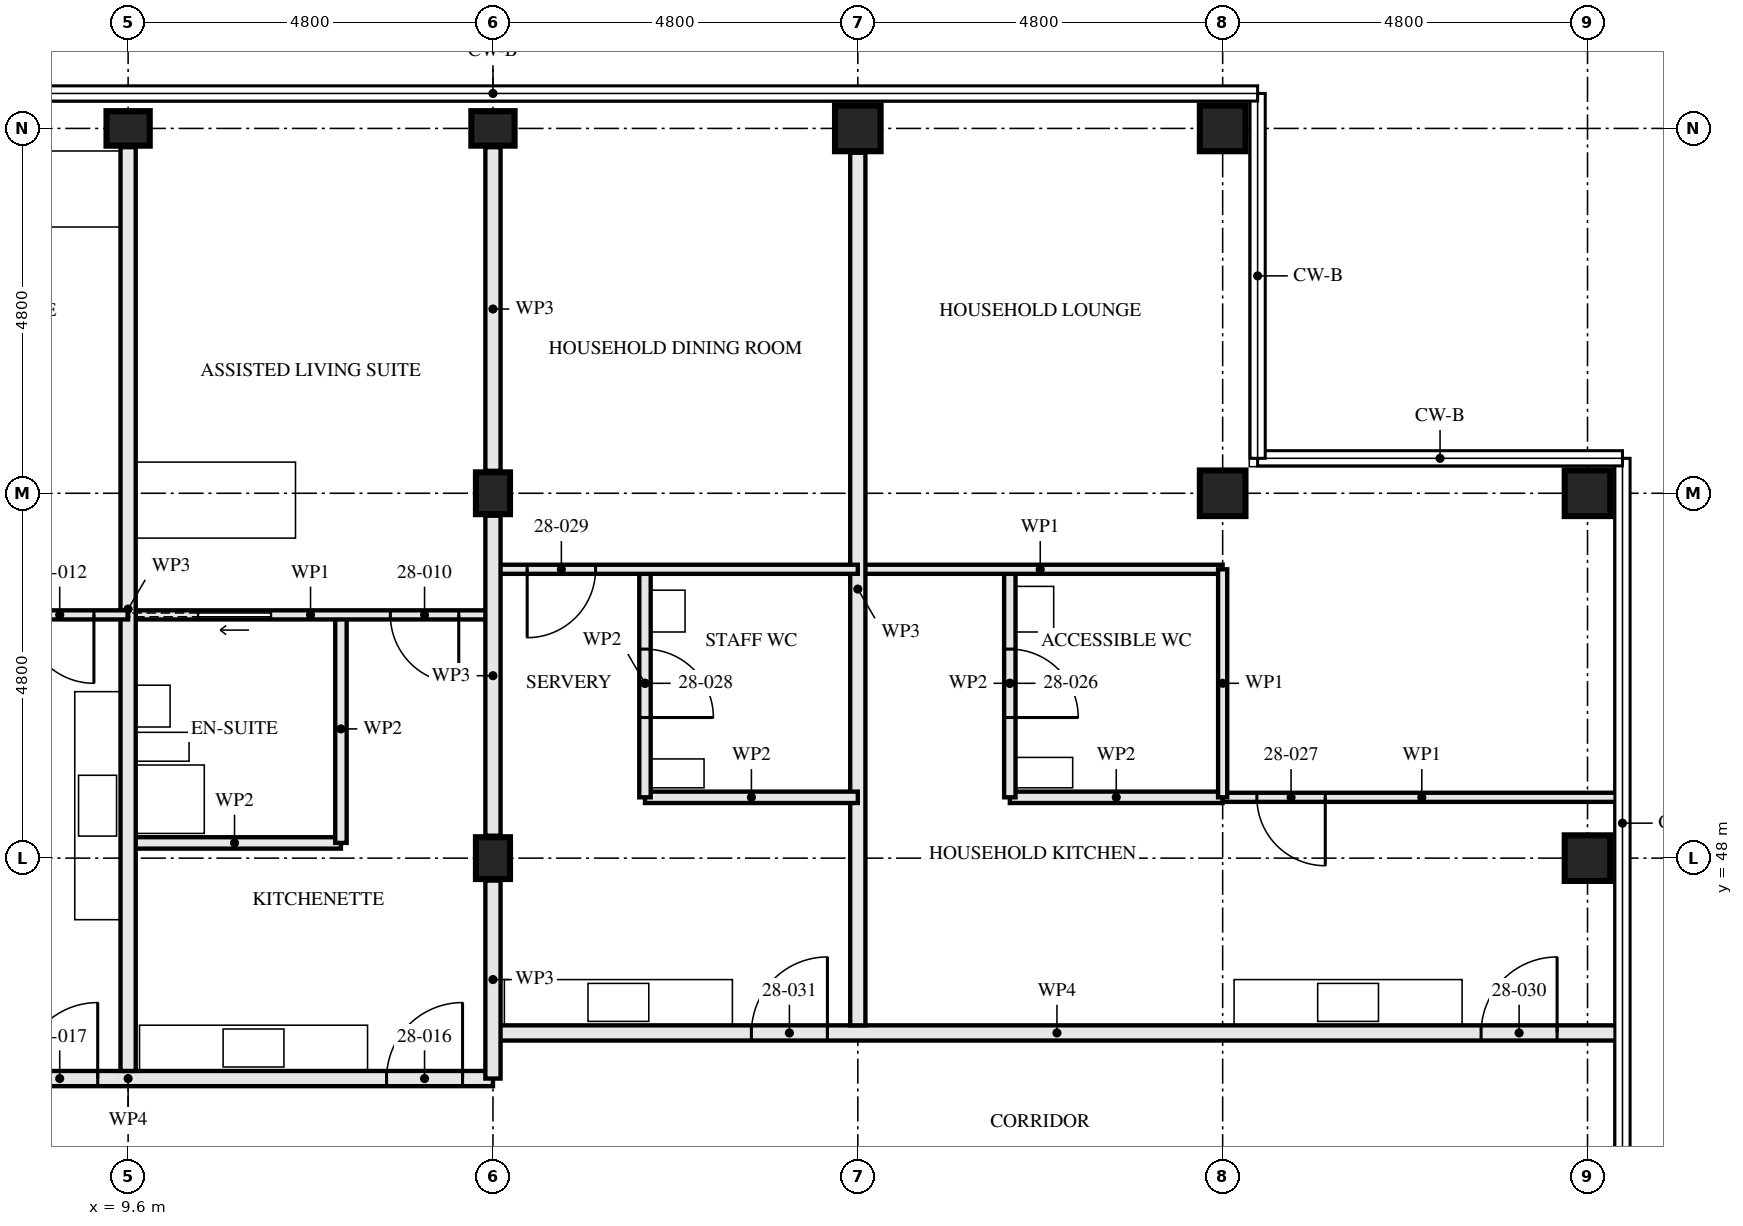
"""IFC4 building model, lengths in metres.
Left out: names, types, materials, properties, quantities, classifications, styles, units other than length and angle.
Written with IfcOpenShell. Run it as: python <this file> out.ifc"""

import sys

from ifc_helpers import new_model, si_unit, direction, frame, frame_2d, origin, origin_2d, place, context, subcontext, project, spatial, rectangle, hollow_rectangle, i_section, extrude, element, fill, save


model = new_model("IFC4")
c1 = context("Model", 3, precision=1e-05, world=origin(), true_north=direction((0.0, 1.0)))
c2 = subcontext(c1, "Body", "Model", "MODEL_VIEW")
j1 = project(units=[si_unit("LENGTHUNIT", "METRE"), si_unit("PLANEANGLEUNIT", "RADIAN")], contexts=[c1])
p1 = place(None, origin())
s1 = spatial("IfcSite", under=j1, at=p1, CompositionType="ELEMENT")
p2 = place(p1, origin())
s2 = spatial("IfcBuilding", under=s1, at=p2, CompositionType="ELEMENT")
p3 = place(p2, frame((0.0, 0.0, 105.0)))
s3 = spatial("IfcBuildingStorey", under=s2, at=p3, CompositionType="ELEMENT", Elevation=105.0)
p4 = place(p3, frame((9.6, 57.6, 0.0), z_axis=(0.0, 0.0, 1.0), x_axis=(0.0, 1.0, 0.0)))
e1 = element("IfcColumn", 1, at=p4, inside=s3, PredefinedType="COLUMN", context=c2, shape_type="SweptSolid", body=[
    extrude(i_section(OverallWidth=0.454, OverallDepth=0.569, WebThickness=0.078, FlangeThickness=0.125, FilletRadius=0.015, at=origin_2d()), origin(), (0.0, 0.0, 1.0), 3.5),
])
for number, where, z_axis, x_axis in (
    (2, (14.4, 48.0, 0.0), (0.0, 0.0, 1.0), (1.0, 0.0, 0.0)),
    (3, (14.4, 52.8, 0.0), (0.0, 0.0, 1.0), (1.0, 0.0, 0.0)),
):
    element("IfcColumn", number, at=place(p3, frame(where, z_axis=z_axis, x_axis=x_axis)), inside=s3, PredefinedType="COLUMN", context=c2, shape_type="SweptSolid", body=[
        extrude(i_section(OverallWidth=0.448, OverallDepth=0.55, WebThickness=0.072, FlangeThickness=0.115, FilletRadius=0.015, at=origin_2d()), origin(), (0.0, 0.0, 1.0), 3.5),
    ])
p5 = place(p3, frame((14.4, 57.6, 0.0), z_axis=(0.0, 0.0, 1.0), x_axis=(0.0, 1.0, 0.0)))
e4 = element("IfcColumn", 4, at=p5, inside=s3, PredefinedType="COLUMN", context=c2, shape_type="SweptSolid", body=[
    extrude(i_section(OverallWidth=0.454, OverallDepth=0.569, WebThickness=0.078, FlangeThickness=0.125, FilletRadius=0.015, at=origin_2d()), origin(), (0.0, 0.0, 1.0), 3.5),
])
for number, where, z_axis, x_axis in (
    (5, (19.2, 57.6, 0.0), (0.0, 0.0, 1.0), (0.0, 1.0, 0.0)),
    (6, (24.0, 52.8, 0.0), (0.0, 0.0, 1.0), (0.0, 1.0, 0.0)),
    (7, (24.0, 57.6, 0.0), (0.0, 0.0, 1.0), (0.0, 1.0, 0.0)),
):
    element("IfcColumn", number, at=place(p3, frame(where, z_axis=z_axis, x_axis=x_axis)), inside=s3, PredefinedType="COLUMN", context=c2, shape_type="SweptSolid", body=[
        extrude(hollow_rectangle(XDim=0.6, YDim=0.6, WallThickness=0.06, at=origin_2d()), origin(), (0.0, 0.0, 1.0), 3.5),
    ])
p6 = place(p3, frame((28.8, 48.0, 0.0), z_axis=(0.0, 0.0, 1.0), x_axis=(1.0, 0.0, 0.0)))
e8 = element("IfcColumn", 8, at=p6, inside=s3, PredefinedType="COLUMN", context=c2, shape_type="SweptSolid", body=[
    extrude(hollow_rectangle(XDim=0.6, YDim=0.6, WallThickness=0.08, at=origin_2d()), origin(), (0.0, 0.0, 1.0), 3.5),
])
p7 = place(p3, frame((28.8, 52.8, 0.0), z_axis=(0.0, 0.0, 1.0), x_axis=(0.0, 1.0, 0.0)))
e9 = element("IfcColumn", 9, at=p7, inside=s3, PredefinedType="COLUMN", context=c2, shape_type="SweptSolid", body=[
    extrude(hollow_rectangle(XDim=0.6, YDim=0.6, WallThickness=0.06, at=origin_2d()), origin(), (0.0, 0.0, 1.0), 3.5),
])
p8 = place(p3, frame((12.4, 51.2, 0.0), z_axis=(0.0, 0.0, 1.0), x_axis=(0.0, -1.0, 0.0)))
e10 = element("IfcWall", 10, at=p8, inside=s3, PredefinedType="PARTITIONING", context=c2, shape_type="SweptSolid", body=[
    extrude(rectangle(XDim=3.0, YDim=0.15, at=frame_2d((1.5, 0.0))), origin(), (0.0, 0.0, 1.0), 3.33),
])
p9 = place(p3, frame((12.4, 48.2, 0.0), z_axis=(0.0, 0.0, 1.0), x_axis=(-1.0, 0.0, 0.0)))
e11 = element("IfcWall", 11, at=p9, inside=s3, PredefinedType="PARTITIONING", context=c2, shape_type="SweptSolid", body=[
    extrude(rectangle(XDim=2.8, YDim=0.15, at=frame_2d((1.4, 0.0))), origin(), (0.0, 0.0, 1.0), 3.33),
])
p10 = place(p3, frame((14.4, 51.2, 0.0), z_axis=(0.0, 0.0, 1.0), x_axis=(-1.0, 0.0, 0.0)))
e12 = element("IfcWall", 12, at=p10, inside=s3, PredefinedType="PARTITIONING", context=c2, shape_type="SweptSolid", body=[
    extrude(rectangle(XDim=4.8, YDim=0.12, at=frame_2d((2.4, 0.0))), origin(), (0.0, 0.0, 1.0), 3.33),
])
p11 = place(p10, frame((0.45, 0.0, 0.0)))
e13 = element("IfcOpeningElement", 13, at=p11, cuts=e12, PredefinedType="OPENING", context=c2, shape_type="SweptSolid", body=[
    extrude(rectangle(XDim=0.9, YDim=2.1, at=frame_2d((0.45, 1.05))), frame((0.0, 0.071, 0.0), z_axis=(0.0, -1.0, 0.0), x_axis=(1.0, 0.0, 0.0)), (0.0, 0.0, 1.0), 0.141),
])
p12 = place(p10, frame((2.925, 0.0, 0.0)))
e14 = element("IfcOpeningElement", 14, at=p12, cuts=e12, PredefinedType="OPENING", context=c2, shape_type="SweptSolid", body=[
    extrude(rectangle(XDim=0.95, YDim=2.1, at=frame_2d((0.475, 1.05))), frame((0.0, 0.071, 0.0), z_axis=(0.0, -1.0, 0.0), x_axis=(1.0, 0.0, 0.0)), (0.0, 0.0, 1.0), 0.141),
])
p13 = place(p3, frame((9.6, 57.353, 0.0), z_axis=(0.0, 0.0, 1.0), x_axis=(0.0, -1.0, 0.0)))
e15 = element("IfcWall", 15, at=p13, inside=s3, PredefinedType="PARTITIONING", context=c2, shape_type="SweptSolid", body=[
    extrude(rectangle(XDim=12.153, YDim=0.2, at=frame_2d((6.077, 0.0))), origin(), (0.0, 0.0, 1.0), 2.55),
])
p14 = place(p3, frame((9.6, 51.2, 0.0), z_axis=(0.0, 0.0, 1.0), x_axis=(-1.0, 0.0, 0.0)))
e16 = element("IfcWall", 16, at=p14, inside=s3, PredefinedType="PARTITIONING", context=c2, shape_type="SweptSolid", body=[
    extrude(rectangle(XDim=4.8, YDim=0.12, at=frame_2d((2.4, 0.0))), origin(), (0.0, 0.0, 1.0), 3.33),
])
p15 = place(p14, frame((0.45, 0.0, 0.0)))
e17 = element("IfcOpeningElement", 17, at=p15, cuts=e16, PredefinedType="OPENING", context=c2, shape_type="SweptSolid", body=[
    extrude(rectangle(XDim=0.9, YDim=2.1, at=frame_2d((0.45, 1.05))), frame((0.0, 0.071, 0.0), z_axis=(0.0, -1.0, 0.0), x_axis=(1.0, 0.0, 0.0)), (0.0, 0.0, 1.0), 0.141),
])
p16 = place(p14, frame((2.925, 0.0, 0.0)))
e18 = element("IfcOpeningElement", 18, at=p16, cuts=e16, PredefinedType="OPENING", context=c2, shape_type="SweptSolid", body=[
    extrude(rectangle(XDim=0.95, YDim=2.1, at=frame_2d((0.475, 1.05))), frame((0.0, 0.071, 0.0), z_axis=(0.0, -1.0, 0.0), x_axis=(1.0, 0.0, 0.0)), (0.0, 0.0, 1.0), 0.141),
])
p17 = place(p3, frame((14.4, 45.1, 0.0), z_axis=(0.0, 0.0, 1.0), x_axis=(-1.0, 0.0, 0.0)))
e19 = element("IfcWall", 19, at=p17, inside=s3, PredefinedType="PARTITIONING", context=c2, shape_type="SweptSolid", body=[
    extrude(rectangle(XDim=9.6, YDim=0.2, at=frame_2d((4.8, 0.0))), origin(), (0.0, 0.0, 1.0), 3.33),
])
p18 = place(p17, frame((0.4, 0.0, 0.0)))
e20 = element("IfcOpeningElement", 20, at=p18, cuts=e19, PredefinedType="OPENING", context=c2, shape_type="SweptSolid", body=[
    extrude(rectangle(XDim=1.0, YDim=2.1, at=frame_2d((0.5, 1.05))), frame((0.0, 0.111, 0.0), z_axis=(0.0, -1.0, 0.0), x_axis=(1.0, 0.0, 0.0)), (0.0, 0.0, 1.0), 0.221),
])
p19 = place(p17, frame((5.2, 0.0, 0.0)))
e21 = element("IfcOpeningElement", 21, at=p19, cuts=e19, PredefinedType="OPENING", context=c2, shape_type="SweptSolid", body=[
    extrude(rectangle(XDim=1.0, YDim=2.1, at=frame_2d((0.5, 1.05))), frame((0.0, 0.111, 0.0), z_axis=(0.0, -1.0, 0.0), x_axis=(1.0, 0.0, 0.0)), (0.0, 0.0, 1.0), 0.221),
])
p20 = place(p3, frame((21.2, 51.8, 0.0), z_axis=(0.0, 0.0, 1.0), x_axis=(0.0, -1.0, 0.0)))
e22 = element("IfcWall", 22, at=p20, inside=s3, PredefinedType="PARTITIONING", context=c2, shape_type="SweptSolid", body=[
    extrude(rectangle(XDim=3.0, YDim=0.15, at=frame_2d((1.5, 0.0))), origin(), (0.0, 0.0, 1.0), 3.33),
])
p21 = place(p20, frame((1.05, 0.0, 0.0)))
e23 = element("IfcOpeningElement", 23, at=p21, cuts=e22, PredefinedType="OPENING", context=c2, shape_type="SweptSolid", body=[
    extrude(rectangle(XDim=0.9, YDim=2.1, at=frame_2d((0.45, 1.05))), frame((0.0, 0.085, 0.0), z_axis=(0.0, -1.0, 0.0), x_axis=(1.0, 0.0, 0.0)), (0.0, 0.0, 1.0), 0.171),
])
p22 = place(p3, frame((24.0, 48.8, 0.0), z_axis=(0.0, 0.0, 1.0), x_axis=(-1.0, 0.0, 0.0)))
e24 = element("IfcWall", 24, at=p22, inside=s3, PredefinedType="PARTITIONING", context=c2, shape_type="SweptSolid", body=[
    extrude(rectangle(XDim=2.8, YDim=0.15, at=frame_2d((1.4, 0.0))), origin(), (0.0, 0.0, 1.0), 3.33),
])
p23 = place(p3, frame((29.24, 48.8, 0.0), z_axis=(0.0, 0.0, 1.0), x_axis=(-1.0, 0.0, 0.0)))
e25 = element("IfcWall", 25, at=p23, inside=s3, PredefinedType="PARTITIONING", context=c2, shape_type="SweptSolid", body=[
    extrude(rectangle(XDim=5.24, YDim=0.12, at=frame_2d((2.62, 0.0))), origin(), (0.0, 0.0, 1.0), 2.32),
])
p24 = place(p23, frame((3.89, 0.0, 0.0)))
e26 = element("IfcOpeningElement", 26, at=p24, cuts=e25, PredefinedType="OPENING", context=c2, shape_type="SweptSolid", body=[
    extrude(rectangle(XDim=0.9, YDim=2.1, at=frame_2d((0.45, 1.05))), frame((0.0, 0.071, 0.0), z_axis=(0.0, -1.0, 0.0), x_axis=(1.0, 0.0, 0.0)), (0.0, 0.0, 1.0), 0.141),
])
p25 = place(p3, frame((24.0, 51.8, 0.0), z_axis=(0.0, 0.0, 1.0), x_axis=(-1.0, 0.0, 0.0)))
e27 = element("IfcWall", 27, at=p25, inside=s3, PredefinedType="PARTITIONING", context=c2, shape_type="SweptSolid", body=[
    extrude(rectangle(XDim=4.8, YDim=0.12, at=frame_2d((2.4, 0.0))), origin(), (0.0, 0.0, 1.0), 3.33),
])
p26 = place(p3, frame((24.0, 51.8, 0.0), z_axis=(0.0, 0.0, 1.0), x_axis=(0.0, -1.0, 0.0)))
e28 = element("IfcWall", 28, at=p26, inside=s3, PredefinedType="PARTITIONING", context=c2, shape_type="SweptSolid", body=[
    extrude(rectangle(XDim=3.0, YDim=0.12, at=frame_2d((1.5, 0.0))), origin(), (0.0, 0.0, 1.0), 3.33),
])
p27 = place(p3, frame((19.2, 57.28, 0.0), z_axis=(0.0, 0.0, 1.0), x_axis=(0.0, -1.0, 0.0)))
e29 = element("IfcWall", 29, at=p27, inside=s3, PredefinedType="PARTITIONING", context=c2, shape_type="SweptSolid", body=[
    extrude(rectangle(XDim=11.48, YDim=0.2, at=frame_2d((5.74, 0.0))), origin(), (0.0, 0.0, 1.0), 2.55),
])
p28 = place(p3, frame((16.4, 51.8, 0.0), z_axis=(0.0, 0.0, 1.0), x_axis=(0.0, -1.0, 0.0)))
e30 = element("IfcWall", 30, at=p28, inside=s3, PredefinedType="PARTITIONING", context=c2, shape_type="SweptSolid", body=[
    extrude(rectangle(XDim=3.0, YDim=0.15, at=frame_2d((1.5, 0.0))), origin(), (0.0, 0.0, 1.0), 3.33),
])
p29 = place(p28, frame((1.05, 0.0, 0.0)))
e31 = element("IfcOpeningElement", 31, at=p29, cuts=e30, PredefinedType="OPENING", context=c2, shape_type="SweptSolid", body=[
    extrude(rectangle(XDim=0.9, YDim=2.1, at=frame_2d((0.45, 1.05))), frame((0.0, 0.085, 0.0), z_axis=(0.0, -1.0, 0.0), x_axis=(1.0, 0.0, 0.0)), (0.0, 0.0, 1.0), 0.171),
])
p30 = place(p3, frame((19.2, 48.8, 0.0), z_axis=(0.0, 0.0, 1.0), x_axis=(-1.0, 0.0, 0.0)))
e32 = element("IfcWall", 32, at=p30, inside=s3, PredefinedType="PARTITIONING", context=c2, shape_type="SweptSolid", body=[
    extrude(rectangle(XDim=2.8, YDim=0.15, at=frame_2d((1.4, 0.0))), origin(), (0.0, 0.0, 1.0), 3.33),
])
p31 = place(p3, frame((19.2, 51.8, 0.0), z_axis=(0.0, 0.0, 1.0), x_axis=(-1.0, 0.0, 0.0)))
e33 = element("IfcWall", 33, at=p31, inside=s3, PredefinedType="PARTITIONING", context=c2, shape_type="SweptSolid", body=[
    extrude(rectangle(XDim=4.8, YDim=0.12, at=frame_2d((2.4, 0.0))), origin(), (0.0, 0.0, 1.0), 3.33),
])
p32 = place(p31, frame((3.45, 0.0, 0.0)))
e34 = element("IfcOpeningElement", 34, at=p32, cuts=e33, PredefinedType="OPENING", context=c2, shape_type="SweptSolid", body=[
    extrude(rectangle(XDim=0.9, YDim=2.1, at=frame_2d((0.45, 1.05))), frame((0.0, 0.071, 0.0), z_axis=(0.0, -1.0, 0.0), x_axis=(1.0, 0.0, 0.0)), (0.0, 0.0, 1.0), 0.141),
])
p33 = place(p3, frame((29.24, 45.7, 0.0), z_axis=(0.0, 0.0, 1.0), x_axis=(-1.0, 0.0, 0.0)))
e35 = element("IfcWall", 35, at=p33, inside=s3, PredefinedType="PARTITIONING", context=c2, shape_type="SweptSolid", body=[
    extrude(rectangle(XDim=14.84, YDim=0.2, at=frame_2d((7.42, 0.0))), origin(), (0.0, 0.0, 1.0), 2.32),
])
p34 = place(p33, frame((0.84, 0.0, 0.0)))
e36 = element("IfcOpeningElement", 36, at=p34, cuts=e35, PredefinedType="OPENING", context=c2, shape_type="SweptSolid", body=[
    extrude(rectangle(XDim=1.0, YDim=2.1, at=frame_2d((0.5, 1.05))), frame((0.0, 0.111, 0.0), z_axis=(0.0, -1.0, 0.0), x_axis=(1.0, 0.0, 0.0)), (0.0, 0.0, 1.0), 0.221),
])
p35 = place(p33, frame((10.44, 0.0, 0.0)))
e37 = element("IfcOpeningElement", 37, at=p35, cuts=e35, PredefinedType="OPENING", context=c2, shape_type="SweptSolid", body=[
    extrude(rectangle(XDim=1.0, YDim=2.1, at=frame_2d((0.5, 1.05))), frame((0.0, 0.111, 0.0), z_axis=(0.0, -1.0, 0.0), x_axis=(1.0, 0.0, 0.0)), (0.0, 0.0, 1.0), 0.221),
])
p36 = place(p3, frame((14.4, 45.1, 0.0), z_axis=(0.0, 0.0, 1.0), x_axis=(0.0, 1.0, 0.0)))
e38 = element("IfcWall", 38, at=p36, inside=s3, PredefinedType="PARTITIONING", context=c2, shape_type="SweptSolid", body=[
    extrude(rectangle(XDim=2.605, YDim=0.2, at=frame_2d((1.302, 0.0))), origin(), (0.0, 0.0, 1.0), 2.32),
])
p37 = place(p3, frame((14.4, 48.295, 0.0), z_axis=(0.0, 0.0, 1.0), x_axis=(0.0, 1.0, 0.0)))
e39 = element("IfcWall", 39, at=p37, inside=s3, PredefinedType="PARTITIONING", context=c2, shape_type="SweptSolid", body=[
    extrude(rectangle(XDim=4.21, YDim=0.2, at=frame_2d((2.105, 0.0))), origin(), (0.0, 0.0, 1.0), 2.32),
])
p38 = place(p3, frame((14.4, 53.095, 0.0), z_axis=(0.0, 0.0, 1.0), x_axis=(0.0, 1.0, 0.0)))
e40 = element("IfcWall", 40, at=p38, inside=s3, PredefinedType="PARTITIONING", context=c2, shape_type="SweptSolid", body=[
    extrude(rectangle(XDim=4.258, YDim=0.2, at=frame_2d((2.129, 0.0))), origin(), (0.0, 0.0, 1.0), 2.32),
])
p39 = place(p11, origin())
e41 = element("IfcDoor", 41, at=p39, inside=s3, OperationType="SINGLE_SWING_RIGHT", PredefinedType="DOOR", context=c2, shape_type="SweptSolid", body=[
    extrude(rectangle(XDim=0.9, YDim=2.1, at=frame_2d((0.45, 1.05))), frame((0.0, 0.022, 0.0), z_axis=(0.0, -1.0, 0.0), x_axis=(1.0, 0.0, 0.0)), (0.0, 0.0, 1.0), 0.044),
])
fill(e13, e41)
p40 = place(p12, origin())
e42 = element("IfcDoor", 42, at=p40, inside=s3, OperationType="SLIDING_TO_LEFT", PredefinedType="DOOR", context=c2, shape_type="SweptSolid", body=[
    extrude(rectangle(XDim=0.95, YDim=2.1, at=frame_2d((0.475, 1.05))), frame((0.0, 0.022, 0.0), z_axis=(0.0, -1.0, 0.0), x_axis=(1.0, 0.0, 0.0)), (0.0, 0.0, 1.0), 0.044),
])
fill(e14, e42)
p41 = place(p15, origin())
e43 = element("IfcDoor", 43, at=p41, inside=s3, OperationType="SINGLE_SWING_RIGHT", PredefinedType="DOOR", context=c2, shape_type="SweptSolid", body=[
    extrude(rectangle(XDim=0.9, YDim=2.1, at=frame_2d((0.45, 1.05))), frame((0.0, 0.022, 0.0), z_axis=(0.0, -1.0, 0.0), x_axis=(1.0, 0.0, 0.0)), (0.0, 0.0, 1.0), 0.044),
])
fill(e17, e43)
p42 = place(p18, frame((1.0, 0.0, 0.0), z_axis=(0.0, 0.0, 1.0), x_axis=(-1.0, 0.0, 0.0)))
e44 = element("IfcDoor", 44, at=p42, inside=s3, OperationType="SINGLE_SWING_LEFT", PredefinedType="DOOR", context=c2, shape_type="SweptSolid", body=[
    extrude(rectangle(XDim=1.0, YDim=2.1, at=frame_2d((0.5, 1.05))), frame((0.0, 0.027, 0.0), z_axis=(0.0, -1.0, 0.0), x_axis=(1.0, 0.0, 0.0)), (0.0, 0.0, 1.0), 0.054),
])
fill(e20, e44)
p43 = place(p19, frame((1.0, 0.0, 0.0), z_axis=(0.0, 0.0, 1.0), x_axis=(-1.0, 0.0, 0.0)))
e45 = element("IfcDoor", 45, at=p43, inside=s3, OperationType="SINGLE_SWING_LEFT", PredefinedType="DOOR", context=c2, shape_type="SweptSolid", body=[
    extrude(rectangle(XDim=1.0, YDim=2.1, at=frame_2d((0.5, 1.05))), frame((0.0, 0.027, 0.0), z_axis=(0.0, -1.0, 0.0), x_axis=(1.0, 0.0, 0.0)), (0.0, 0.0, 1.0), 0.054),
])
fill(e21, e45)
p44 = place(p21, origin())
e46 = element("IfcDoor", 46, at=p44, inside=s3, OperationType="SINGLE_SWING_LEFT", PredefinedType="DOOR", context=c2, shape_type="SweptSolid", body=[
    extrude(rectangle(XDim=0.9, YDim=2.1, at=frame_2d((0.45, 1.05))), frame((0.0, 0.022, 0.0), z_axis=(0.0, -1.0, 0.0), x_axis=(1.0, 0.0, 0.0)), (0.0, 0.0, 1.0), 0.044),
])
fill(e23, e46)
p45 = place(p24, origin())
e47 = element("IfcDoor", 47, at=p45, inside=s3, OperationType="SINGLE_SWING_RIGHT", PredefinedType="DOOR", context=c2, shape_type="SweptSolid", body=[
    extrude(rectangle(XDim=0.9, YDim=2.1, at=frame_2d((0.45, 1.05))), frame((0.0, 0.022, 0.0), z_axis=(0.0, -1.0, 0.0), x_axis=(1.0, 0.0, 0.0)), (0.0, 0.0, 1.0), 0.044),
])
fill(e26, e47)
p46 = place(p29, origin())
e48 = element("IfcDoor", 48, at=p46, inside=s3, OperationType="SINGLE_SWING_LEFT", PredefinedType="DOOR", context=c2, shape_type="SweptSolid", body=[
    extrude(rectangle(XDim=0.9, YDim=2.1, at=frame_2d((0.45, 1.05))), frame((0.0, 0.022, 0.0), z_axis=(0.0, -1.0, 0.0), x_axis=(1.0, 0.0, 0.0)), (0.0, 0.0, 1.0), 0.044),
])
fill(e31, e48)
p47 = place(p32, origin())
e49 = element("IfcDoor", 49, at=p47, inside=s3, OperationType="SINGLE_SWING_LEFT", PredefinedType="DOOR", context=c2, shape_type="SweptSolid", body=[
    extrude(rectangle(XDim=0.9, YDim=2.1, at=frame_2d((0.45, 1.05))), frame((0.0, 0.022, 0.0), z_axis=(0.0, -1.0, 0.0), x_axis=(1.0, 0.0, 0.0)), (0.0, 0.0, 1.0), 0.044),
])
fill(e34, e49)
p48 = place(p34, frame((1.0, 0.0, 0.0), z_axis=(0.0, 0.0, 1.0), x_axis=(-1.0, 0.0, 0.0)))
e50 = element("IfcDoor", 50, at=p48, inside=s3, OperationType="SINGLE_SWING_LEFT", PredefinedType="DOOR", context=c2, shape_type="SweptSolid", body=[
    extrude(rectangle(XDim=1.0, YDim=2.1, at=frame_2d((0.5, 1.05))), frame((0.0, 0.027, 0.0), z_axis=(0.0, -1.0, 0.0), x_axis=(1.0, 0.0, 0.0)), (0.0, 0.0, 1.0), 0.054),
])
fill(e36, e50)
p49 = place(p35, frame((1.0, 0.0, 0.0), z_axis=(0.0, 0.0, 1.0), x_axis=(-1.0, 0.0, 0.0)))
e51 = element("IfcDoor", 51, at=p49, inside=s3, OperationType="SINGLE_SWING_LEFT", PredefinedType="DOOR", context=c2, shape_type="SweptSolid", body=[
    extrude(rectangle(XDim=1.0, YDim=2.1, at=frame_2d((0.5, 1.05))), frame((0.0, 0.027, 0.0), z_axis=(0.0, -1.0, 0.0), x_axis=(1.0, 0.0, 0.0)), (0.0, 0.0, 1.0), 0.054),
])
fill(e37, e51)
save(model, sys.argv[1])
